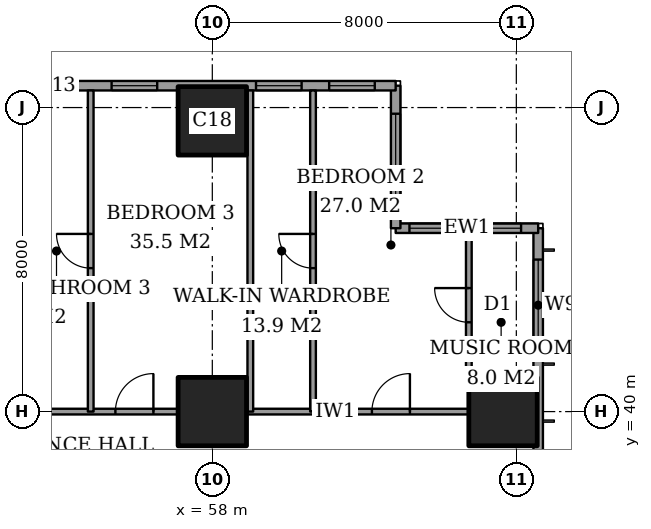
"""IFC4 building model, lengths in metres.
Left out: names, types, materials, properties, quantities, classifications, styles, units other than length and angle.
Written with IfcOpenShell. Run it as: python <this file> out.ifc"""

import sys

from ifc_helpers import new_model, si_unit, direction, frame, frame_2d, origin, origin_2d, place, context, subcontext, project, spatial, rectangle, extrude, element, fill, save


model = new_model("IFC4")
c1 = context("Model", 3, precision=1e-05, world=origin(), true_north=direction((0.0, 1.0)))
c2 = subcontext(c1, "Body", "Model", "MODEL_VIEW")
j1 = project(units=[si_unit("LENGTHUNIT", "METRE"), si_unit("PLANEANGLEUNIT", "RADIAN")], contexts=[c1])
p1 = place(None, origin())
s1 = spatial("IfcSite", under=j1, at=p1, CompositionType="ELEMENT")
p2 = place(p1, origin())
s2 = spatial("IfcBuilding", under=s1, at=p2, CompositionType="ELEMENT")
p3 = place(p2, frame((0.0, 0.0, 218.2)))
s3 = spatial("IfcBuildingStorey", under=s2, at=p3, CompositionType="ELEMENT", Elevation=218.2)
for number, where, z_axis, x_axis in (
    (1, (58.0, 40.0, 0.0), (0.0, 0.0, 1.0), (1.0, 0.0, 0.0)),
    (2, (58.0, 47.65, 0.0), (0.0, 0.0, 1.0), (1.0, 0.0, 0.0)),
    (3, (65.65, 40.0, 0.0), (0.0, 0.0, 1.0), (1.0, 0.0, 0.0)),
):
    element("IfcColumn", number, at=place(p3, frame(where, z_axis=z_axis, x_axis=x_axis)), inside=s3, PredefinedType="COLUMN", context=c2, shape_type="SweptSolid", body=[
        extrude(rectangle(XDim=1.8, YDim=1.8, at=origin_2d()), origin(), (0.0, 0.0, 1.0), 3.6),
    ])
p4 = place(p3, frame((66.575, 3.175, 0.0), z_axis=(0.0, 0.0, 1.0), x_axis=(0.0, 1.0, 0.0)))
e4 = element("IfcWall", 4, at=p4, inside=s3, PredefinedType="SOLIDWALL", context=c2, shape_type="SweptSolid", body=[
    extrude(rectangle(XDim=41.65, YDim=0.25, at=frame_2d((20.825, 0.0))), origin(), (0.0, 0.0, 1.0), 3.6),
])
p5 = place(p4, frame((0.825, 0.0, 0.2)))
e5 = element("IfcOpeningElement", 5, at=p5, cuts=e4, PredefinedType="OPENING", context=c2, shape_type="SweptSolid", body=[
    extrude(rectangle(XDim=2.4, YDim=2.4, at=frame_2d((1.2, 1.2))), frame((0.0, 0.135, 0.0), z_axis=(0.0, -1.0, 0.0), x_axis=(1.0, 0.0, 0.0)), (0.0, 0.0, 1.0), 0.27),
])
p6 = place(p4, frame((6.225, 0.0, 0.2)))
e6 = element("IfcOpeningElement", 6, at=p6, cuts=e4, PredefinedType="OPENING", context=c2, shape_type="SweptSolid", body=[
    extrude(rectangle(XDim=1.2, YDim=2.4, at=frame_2d((0.6, 1.2))), frame((0.0, 0.135, 0.0), z_axis=(0.0, -1.0, 0.0), x_axis=(1.0, 0.0, 0.0)), (0.0, 0.0, 1.0), 0.27),
])
p7 = place(p4, frame((8.675, 0.0, 0.2)))
e7 = element("IfcOpeningElement", 7, at=p7, cuts=e4, PredefinedType="OPENING", context=c2, shape_type="SweptSolid", body=[
    extrude(rectangle(XDim=2.4, YDim=2.4, at=frame_2d((1.2, 1.2))), frame((0.0, 0.135, 0.0), z_axis=(0.0, -1.0, 0.0), x_axis=(1.0, 0.0, 0.0)), (0.0, 0.0, 1.0), 0.27),
])
p8 = place(p4, frame((15.675, 0.0, 0.2)))
e8 = element("IfcOpeningElement", 8, at=p8, cuts=e4, PredefinedType="OPENING", context=c2, shape_type="SweptSolid", body=[
    extrude(rectangle(XDim=2.4, YDim=2.4, at=frame_2d((1.2, 1.2))), frame((0.0, 0.135, 0.0), z_axis=(0.0, -1.0, 0.0), x_axis=(1.0, 0.0, 0.0)), (0.0, 0.0, 1.0), 0.27),
])
p9 = place(p4, frame((23.575, 0.0, 0.2)))
e9 = element("IfcOpeningElement", 9, at=p9, cuts=e4, PredefinedType="OPENING", context=c2, shape_type="SweptSolid", body=[
    extrude(rectangle(XDim=2.4, YDim=2.4, at=frame_2d((1.2, 1.2))), frame((0.0, 0.135, 0.0), z_axis=(0.0, -1.0, 0.0), x_axis=(1.0, 0.0, 0.0)), (0.0, 0.0, 1.0), 0.27),
])
p10 = place(p4, frame((30.775, 0.0, 0.2)))
e10 = element("IfcOpeningElement", 10, at=p10, cuts=e4, PredefinedType="OPENING", context=c2, shape_type="SweptSolid", body=[
    extrude(rectangle(XDim=2.4, YDim=2.4, at=frame_2d((1.2, 1.2))), frame((0.0, 0.135, 0.0), z_axis=(0.0, -1.0, 0.0), x_axis=(1.0, 0.0, 0.0)), (0.0, 0.0, 1.0), 0.27),
])
p11 = place(p4, frame((34.55, 0.0, 0.2)))
e11 = element("IfcOpeningElement", 11, at=p11, cuts=e4, PredefinedType="OPENING", context=c2, shape_type="SweptSolid", body=[
    extrude(rectangle(XDim=1.2, YDim=2.4, at=frame_2d((0.6, 1.2))), frame((0.0, 0.135, 0.0), z_axis=(0.0, -1.0, 0.0), x_axis=(1.0, 0.0, 0.0)), (0.0, 0.0, 1.0), 0.27),
])
p12 = place(p4, frame((38.425, 0.0, 0.2)))
e12 = element("IfcOpeningElement", 12, at=p12, cuts=e4, PredefinedType="OPENING", context=c2, shape_type="SweptSolid", body=[
    extrude(rectangle(XDim=2.4, YDim=2.4, at=frame_2d((1.2, 1.2))), frame((0.0, 0.135, 0.0), z_axis=(0.0, -1.0, 0.0), x_axis=(1.0, 0.0, 0.0)), (0.0, 0.0, 1.0), 0.27),
])
p13 = place(p3, frame((66.575, 44.825, 0.0), z_axis=(0.0, 0.0, 1.0), x_axis=(-1.0, 0.0, 0.0)))
e13 = element("IfcWall", 13, at=p13, inside=s3, PredefinedType="SOLIDWALL", context=c2, shape_type="SweptSolid", body=[
    extrude(rectangle(XDim=3.75, YDim=0.25, at=frame_2d((1.875, 0.0))), origin(), (0.0, 0.0, 1.0), 3.6),
])
p14 = place(p13, frame((0.45, 0.0, 0.2)))
e14 = element("IfcOpeningElement", 14, at=p14, cuts=e13, PredefinedType="OPENING", context=c2, shape_type="SweptSolid", body=[
    extrude(rectangle(XDim=1.2, YDim=2.4, at=frame_2d((0.6, 1.2))), frame((0.0, 0.135, 0.0), z_axis=(0.0, -1.0, 0.0), x_axis=(1.0, 0.0, 0.0)), (0.0, 0.0, 1.0), 0.27),
])
p15 = place(p13, frame((2.188, 0.0, 0.2)))
e15 = element("IfcOpeningElement", 15, at=p15, cuts=e13, PredefinedType="OPENING", context=c2, shape_type="SweptSolid", body=[
    extrude(rectangle(XDim=1.2, YDim=2.4, at=frame_2d((0.6, 1.2))), frame((0.0, 0.135, 0.0), z_axis=(0.0, -1.0, 0.0), x_axis=(1.0, 0.0, 0.0)), (0.0, 0.0, 1.0), 0.27),
])
p16 = place(p3, frame((62.825, 44.825, 0.0), z_axis=(0.0, 0.0, 1.0), x_axis=(0.0, 1.0, 0.0)))
e16 = element("IfcWall", 16, at=p16, inside=s3, PredefinedType="SOLIDWALL", context=c2, shape_type="SweptSolid", body=[
    extrude(rectangle(XDim=3.75, YDim=0.25, at=frame_2d((1.875, 0.0))), origin(), (0.0, 0.0, 1.0), 3.6),
])
p17 = place(p16, frame((0.613, 0.0, 0.2)))
e17 = element("IfcOpeningElement", 17, at=p17, cuts=e16, PredefinedType="OPENING", context=c2, shape_type="SweptSolid", body=[
    extrude(rectangle(XDim=2.4, YDim=2.4, at=frame_2d((1.2, 1.2))), frame((0.0, 0.135, 0.0), z_axis=(0.0, -1.0, 0.0), x_axis=(1.0, 0.0, 0.0)), (0.0, 0.0, 1.0), 0.27),
])
p18 = place(p3, frame((62.825, 48.575, 0.0), z_axis=(0.0, 0.0, 1.0), x_axis=(-1.0, 0.0, 0.0)))
e18 = element("IfcWall", 18, at=p18, inside=s3, PredefinedType="SOLIDWALL", context=c2, shape_type="SweptSolid", body=[
    extrude(rectangle(XDim=21.4, YDim=0.25, at=frame_2d((10.7, 0.0))), origin(), (0.0, 0.0, 1.0), 3.6),
])
p19 = place(p18, frame((0.55, 0.0, 0.2)))
e19 = element("IfcOpeningElement", 19, at=p19, cuts=e18, PredefinedType="OPENING", context=c2, shape_type="SweptSolid", body=[
    extrude(rectangle(XDim=1.2, YDim=2.4, at=frame_2d((0.6, 1.2))), frame((0.0, 0.135, 0.0), z_axis=(0.0, -1.0, 0.0), x_axis=(1.0, 0.0, 0.0)), (0.0, 0.0, 1.0), 0.27),
])
p20 = place(p18, frame((2.475, 0.0, 0.2)))
e20 = element("IfcOpeningElement", 20, at=p20, cuts=e18, PredefinedType="OPENING", context=c2, shape_type="SweptSolid", body=[
    extrude(rectangle(XDim=1.2, YDim=2.4, at=frame_2d((0.6, 1.2))), frame((0.0, 0.135, 0.0), z_axis=(0.0, -1.0, 0.0), x_axis=(1.0, 0.0, 0.0)), (0.0, 0.0, 1.0), 0.27),
])
p21 = place(p18, frame((6.275, 0.0, 0.2)))
e21 = element("IfcOpeningElement", 21, at=p21, cuts=e18, PredefinedType="OPENING", context=c2, shape_type="SweptSolid", body=[
    extrude(rectangle(XDim=1.2, YDim=2.4, at=frame_2d((0.6, 1.2))), frame((0.0, 0.135, 0.0), z_axis=(0.0, -1.0, 0.0), x_axis=(1.0, 0.0, 0.0)), (0.0, 0.0, 1.0), 0.27),
])
p22 = place(p18, frame((8.4, 0.0, 0.2)))
e22 = element("IfcOpeningElement", 22, at=p22, cuts=e18, PredefinedType="OPENING", context=c2, shape_type="SweptSolid", body=[
    extrude(rectangle(XDim=1.2, YDim=2.4, at=frame_2d((0.6, 1.2))), frame((0.0, 0.135, 0.0), z_axis=(0.0, -1.0, 0.0), x_axis=(1.0, 0.0, 0.0)), (0.0, 0.0, 1.0), 0.27),
])
p23 = place(p18, frame((10.275, 0.0, 0.2)))
e23 = element("IfcOpeningElement", 23, at=p23, cuts=e18, PredefinedType="OPENING", context=c2, shape_type="SweptSolid", body=[
    extrude(rectangle(XDim=1.2, YDim=2.4, at=frame_2d((0.6, 1.2))), frame((0.0, 0.135, 0.0), z_axis=(0.0, -1.0, 0.0), x_axis=(1.0, 0.0, 0.0)), (0.0, 0.0, 1.0), 0.27),
])
p24 = place(p18, frame((15.175, 0.0, 0.2)))
e24 = element("IfcOpeningElement", 24, at=p24, cuts=e18, PredefinedType="OPENING", context=c2, shape_type="SweptSolid", body=[
    extrude(rectangle(XDim=1.2, YDim=2.4, at=frame_2d((0.6, 1.2))), frame((0.0, 0.135, 0.0), z_axis=(0.0, -1.0, 0.0), x_axis=(1.0, 0.0, 0.0)), (0.0, 0.0, 1.0), 0.27),
])
p25 = place(p18, frame((17.8, 0.0, 0.2)))
e25 = element("IfcOpeningElement", 25, at=p25, cuts=e18, PredefinedType="OPENING", context=c2, shape_type="SweptSolid", body=[
    extrude(rectangle(XDim=1.2, YDim=2.4, at=frame_2d((0.6, 1.2))), frame((0.0, 0.135, 0.0), z_axis=(0.0, -1.0, 0.0), x_axis=(1.0, 0.0, 0.0)), (0.0, 0.0, 1.0), 0.27),
])
p26 = place(p3, frame((51.2, 40.0, 0.0), z_axis=(0.0, 0.0, 1.0), x_axis=(1.0, 0.0, 0.0)))
e26 = element("IfcWall", 26, at=p26, inside=s3, PredefinedType="PARTITIONING", context=c2, shape_type="SweptSolid", body=[
    extrude(rectangle(XDim=5.9, YDim=0.15, at=frame_2d((2.95, 0.0))), origin(), (0.0, 0.0, 1.0), 3.35),
])
p27 = place(p26, frame((4.25, 0.0, 0.0)))
e27 = element("IfcOpeningElement", 27, at=p27, cuts=e26, PredefinedType="OPENING", context=c2, shape_type="SweptSolid", body=[
    extrude(rectangle(XDim=1.0, YDim=2.1, at=frame_2d((0.5, 1.05))), frame((0.0, 0.085, 0.0), z_axis=(0.0, -1.0, 0.0), x_axis=(1.0, 0.0, 0.0)), (0.0, 0.0, 1.0), 0.17),
])
p28 = place(p26, frame((0.4, 0.0, 0.0)))
e28 = element("IfcOpeningElement", 28, at=p28, cuts=e26, PredefinedType="OPENING", context=c2, shape_type="SweptSolid", body=[
    extrude(rectangle(XDim=1.0, YDim=2.1, at=frame_2d((0.5, 1.05))), frame((0.0, 0.085, 0.0), z_axis=(0.0, -1.0, 0.0), x_axis=(1.0, 0.0, 0.0)), (0.0, 0.0, 1.0), 0.17),
])
p29 = place(p3, frame((58.9, 40.0, 0.0), z_axis=(0.0, 0.0, 1.0), x_axis=(1.0, 0.0, 0.0)))
e29 = element("IfcWall", 29, at=p29, inside=s3, PredefinedType="PARTITIONING", context=c2, shape_type="SweptSolid", body=[
    extrude(rectangle(XDim=5.85, YDim=0.15, at=frame_2d((2.925, 0.0))), origin(), (0.0, 0.0, 1.0), 3.35),
])
p30 = place(p29, frame((3.3, 0.0, 0.0)))
e30 = element("IfcOpeningElement", 30, at=p30, cuts=e29, PredefinedType="OPENING", context=c2, shape_type="SweptSolid", body=[
    extrude(rectangle(XDim=1.0, YDim=2.1, at=frame_2d((0.5, 1.05))), frame((0.0, 0.085, 0.0), z_axis=(0.0, -1.0, 0.0), x_axis=(1.0, 0.0, 0.0)), (0.0, 0.0, 1.0), 0.17),
])
p31 = place(p3, frame((54.8, 40.0, 0.0), z_axis=(0.0, 0.0, 1.0), x_axis=(0.0, 1.0, 0.0)))
e31 = element("IfcWall", 31, at=p31, inside=s3, PredefinedType="PARTITIONING", context=c2, shape_type="SweptSolid", body=[
    extrude(rectangle(XDim=8.45, YDim=0.15, at=frame_2d((4.225, 0.0))), origin(), (0.0, 0.0, 1.0), 3.35),
])
p32 = place(p31, frame((3.775, 0.0, 0.0)))
e32 = element("IfcOpeningElement", 32, at=p32, cuts=e31, PredefinedType="OPENING", context=c2, shape_type="SweptSolid", body=[
    extrude(rectangle(XDim=0.9, YDim=2.1, at=frame_2d((0.45, 1.05))), frame((0.0, 0.085, 0.0), z_axis=(0.0, -1.0, 0.0), x_axis=(1.0, 0.0, 0.0)), (0.0, 0.0, 1.0), 0.17),
])
p33 = place(p3, frame((59.0, 40.0, 0.0), z_axis=(0.0, 0.0, 1.0), x_axis=(0.0, 1.0, 0.0)))
e33 = element("IfcWall", 33, at=p33, inside=s3, PredefinedType="PARTITIONING", context=c2, shape_type="SweptSolid", body=[
    extrude(rectangle(XDim=8.45, YDim=0.15, at=frame_2d((4.225, 0.0))), origin(), (0.0, 0.0, 1.0), 3.35),
])
p34 = place(p3, frame((60.65, 40.0, 0.0), z_axis=(0.0, 0.0, 1.0), x_axis=(0.0, 1.0, 0.0)))
e34 = element("IfcWall", 34, at=p34, inside=s3, PredefinedType="PARTITIONING", context=c2, shape_type="SweptSolid", body=[
    extrude(rectangle(XDim=8.45, YDim=0.15, at=frame_2d((4.225, 0.0))), origin(), (0.0, 0.0, 1.0), 3.35),
])
p35 = place(p34, frame((3.775, 0.0, 0.0)))
e35 = element("IfcOpeningElement", 35, at=p35, cuts=e34, PredefinedType="OPENING", context=c2, shape_type="SweptSolid", body=[
    extrude(rectangle(XDim=0.9, YDim=2.1, at=frame_2d((0.45, 1.05))), frame((0.0, 0.085, 0.0), z_axis=(0.0, -1.0, 0.0), x_axis=(1.0, 0.0, 0.0)), (0.0, 0.0, 1.0), 0.17),
])
p36 = place(p3, frame((64.75, 40.9, 0.0), z_axis=(0.0, 0.0, 1.0), x_axis=(0.0, 1.0, 0.0)))
e36 = element("IfcWall", 36, at=p36, inside=s3, PredefinedType="PARTITIONING", context=c2, shape_type="SweptSolid", body=[
    extrude(rectangle(XDim=3.8, YDim=0.15, at=frame_2d((1.9, 0.0))), origin(), (0.0, 0.0, 1.0), 3.35),
])
p37 = place(p36, frame((1.45, 0.0, 0.0)))
e37 = element("IfcOpeningElement", 37, at=p37, cuts=e36, PredefinedType="OPENING", context=c2, shape_type="SweptSolid", body=[
    extrude(rectangle(XDim=0.9, YDim=2.1, at=frame_2d((0.45, 1.05))), frame((0.0, 0.085, 0.0), z_axis=(0.0, -1.0, 0.0), x_axis=(1.0, 0.0, 0.0)), (0.0, 0.0, 1.0), 0.17),
])
p38 = place(p12, origin())
e38 = element("IfcWindow", 38, at=p38, inside=s3, PartitioningType="SINGLE_PANEL", PredefinedType="WINDOW", context=c2, shape_type="SweptSolid", body=[
    extrude(rectangle(XDim=2.4, YDim=2.4, at=frame_2d((1.2, 1.2))), frame((0.0, 0.03, 0.0), z_axis=(0.0, -1.0, 0.0), x_axis=(1.0, 0.0, 0.0)), (0.0, 0.0, 1.0), 0.06),
])
fill(e12, e38)
p39 = place(p14, origin())
e39 = element("IfcWindow", 39, at=p39, inside=s3, PartitioningType="SINGLE_PANEL", PredefinedType="WINDOW", context=c2, shape_type="SweptSolid", body=[
    extrude(rectangle(XDim=1.2, YDim=2.4, at=frame_2d((0.6, 1.2))), frame((0.0, 0.03, 0.0), z_axis=(0.0, -1.0, 0.0), x_axis=(1.0, 0.0, 0.0)), (0.0, 0.0, 1.0), 0.06),
])
fill(e14, e39)
p40 = place(p15, origin())
e40 = element("IfcWindow", 40, at=p40, inside=s3, PartitioningType="SINGLE_PANEL", PredefinedType="WINDOW", context=c2, shape_type="SweptSolid", body=[
    extrude(rectangle(XDim=1.2, YDim=2.4, at=frame_2d((0.6, 1.2))), frame((0.0, 0.03, 0.0), z_axis=(0.0, -1.0, 0.0), x_axis=(1.0, 0.0, 0.0)), (0.0, 0.0, 1.0), 0.06),
])
fill(e15, e40)
p41 = place(p17, origin())
e41 = element("IfcWindow", 41, at=p41, inside=s3, PartitioningType="SINGLE_PANEL", PredefinedType="WINDOW", context=c2, shape_type="SweptSolid", body=[
    extrude(rectangle(XDim=2.4, YDim=2.4, at=frame_2d((1.2, 1.2))), frame((0.0, 0.03, 0.0), z_axis=(0.0, -1.0, 0.0), x_axis=(1.0, 0.0, 0.0)), (0.0, 0.0, 1.0), 0.06),
])
fill(e17, e41)
p42 = place(p19, origin())
e42 = element("IfcWindow", 42, at=p42, inside=s3, PartitioningType="SINGLE_PANEL", PredefinedType="WINDOW", context=c2, shape_type="SweptSolid", body=[
    extrude(rectangle(XDim=1.2, YDim=2.4, at=frame_2d((0.6, 1.2))), frame((0.0, 0.03, 0.0), z_axis=(0.0, -1.0, 0.0), x_axis=(1.0, 0.0, 0.0)), (0.0, 0.0, 1.0), 0.06),
])
fill(e19, e42)
p43 = place(p20, origin())
e43 = element("IfcWindow", 43, at=p43, inside=s3, PartitioningType="SINGLE_PANEL", PredefinedType="WINDOW", context=c2, shape_type="SweptSolid", body=[
    extrude(rectangle(XDim=1.2, YDim=2.4, at=frame_2d((0.6, 1.2))), frame((0.0, 0.03, 0.0), z_axis=(0.0, -1.0, 0.0), x_axis=(1.0, 0.0, 0.0)), (0.0, 0.0, 1.0), 0.06),
])
fill(e20, e43)
p44 = place(p21, origin())
e44 = element("IfcWindow", 44, at=p44, inside=s3, PartitioningType="SINGLE_PANEL", PredefinedType="WINDOW", context=c2, shape_type="SweptSolid", body=[
    extrude(rectangle(XDim=1.2, YDim=2.4, at=frame_2d((0.6, 1.2))), frame((0.0, 0.03, 0.0), z_axis=(0.0, -1.0, 0.0), x_axis=(1.0, 0.0, 0.0)), (0.0, 0.0, 1.0), 0.06),
])
fill(e21, e44)
p45 = place(p22, origin())
e45 = element("IfcWindow", 45, at=p45, inside=s3, PartitioningType="SINGLE_PANEL", PredefinedType="WINDOW", context=c2, shape_type="SweptSolid", body=[
    extrude(rectangle(XDim=1.2, YDim=2.4, at=frame_2d((0.6, 1.2))), frame((0.0, 0.03, 0.0), z_axis=(0.0, -1.0, 0.0), x_axis=(1.0, 0.0, 0.0)), (0.0, 0.0, 1.0), 0.06),
])
fill(e22, e45)
p46 = place(p37, origin())
e46 = element("IfcDoor", 46, at=p46, inside=s3, OperationType="SINGLE_SWING_LEFT", PredefinedType="DOOR", context=c2, shape_type="SweptSolid", body=[
    extrude(rectangle(XDim=0.9, YDim=2.1, at=frame_2d((0.45, 1.05))), frame((0.0, 0.025, 0.0), z_axis=(0.0, -1.0, 0.0), x_axis=(1.0, 0.0, 0.0)), (0.0, 0.0, 1.0), 0.05),
])
fill(e37, e46)
p47 = place(p30, origin())
e47 = element("IfcDoor", 47, at=p47, inside=s3, OperationType="SINGLE_SWING_LEFT", PredefinedType="DOOR", context=c2, shape_type="SweptSolid", body=[
    extrude(rectangle(XDim=1.0, YDim=2.1, at=frame_2d((0.5, 1.05))), frame((0.0, 0.025, 0.0), z_axis=(0.0, -1.0, 0.0), x_axis=(1.0, 0.0, 0.0)), (0.0, 0.0, 1.0), 0.05),
])
fill(e30, e47)
p48 = place(p35, origin())
e48 = element("IfcDoor", 48, at=p48, inside=s3, OperationType="SINGLE_SWING_LEFT", PredefinedType="DOOR", context=c2, shape_type="SweptSolid", body=[
    extrude(rectangle(XDim=0.9, YDim=2.1, at=frame_2d((0.45, 1.05))), frame((0.0, 0.025, 0.0), z_axis=(0.0, -1.0, 0.0), x_axis=(1.0, 0.0, 0.0)), (0.0, 0.0, 1.0), 0.05),
])
fill(e35, e48)
p49 = place(p27, origin())
e49 = element("IfcDoor", 49, at=p49, inside=s3, OperationType="SINGLE_SWING_LEFT", PredefinedType="DOOR", context=c2, shape_type="SweptSolid", body=[
    extrude(rectangle(XDim=1.0, YDim=2.1, at=frame_2d((0.5, 1.05))), frame((0.0, 0.025, 0.0), z_axis=(0.0, -1.0, 0.0), x_axis=(1.0, 0.0, 0.0)), (0.0, 0.0, 1.0), 0.05),
])
fill(e27, e49)
p50 = place(p32, origin())
e50 = element("IfcDoor", 50, at=p50, inside=s3, OperationType="SINGLE_SWING_LEFT", PredefinedType="DOOR", context=c2, shape_type="SweptSolid", body=[
    extrude(rectangle(XDim=0.9, YDim=2.1, at=frame_2d((0.45, 1.05))), frame((0.0, 0.025, 0.0), z_axis=(0.0, -1.0, 0.0), x_axis=(1.0, 0.0, 0.0)), (0.0, 0.0, 1.0), 0.05),
])
fill(e32, e50)
save(model, sys.argv[1])
